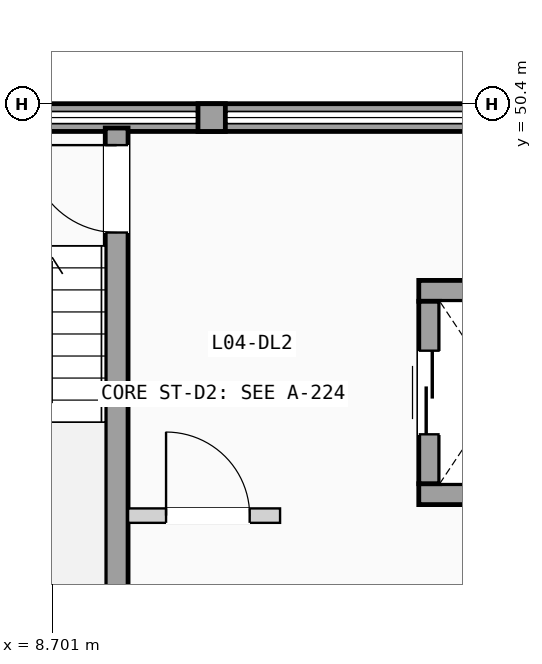
"""IFC4 building model, lengths in metres.
Left out: names, types, materials, properties, quantities, classifications, styles, units other than length and angle.
Written with IfcOpenShell. Run it as: python <this file> out.ifc"""

import sys

from ifc_helpers import new_model, si_unit, direction, frame, frame_2d, origin, place, context, subcontext, project, spatial, rectangle, extrude, element, fill, save


model = new_model("IFC4")
c1 = context("Model", 3, precision=1e-05, world=origin(), true_north=direction((0.0, 1.0)))
c2 = subcontext(c1, "Body", "Model", "MODEL_VIEW")
j1 = project(units=[si_unit("LENGTHUNIT", "METRE"), si_unit("PLANEANGLEUNIT", "RADIAN")], contexts=[c1])
p1 = place(None, origin())
s1 = spatial("IfcSite", under=j1, at=p1, CompositionType="ELEMENT")
p2 = place(p1, origin())
s2 = spatial("IfcBuilding", under=s1, at=p2, CompositionType="ELEMENT")
p3 = place(p2, frame((0.0, 0.0, 15.225)))
s3 = spatial("IfcBuildingStorey", under=s2, at=p3, CompositionType="ELEMENT", Elevation=15.225)
p4 = place(p3, frame((0.0, 50.218, 0.0), z_axis=(0.0, 0.0, 1.0), x_axis=(1.0, 0.0, 0.0)))
e1 = element("IfcWall", 1, at=p4, inside=s3, PredefinedType="SOLIDWALL", context=c2, shape_type="SweptSolid", body=[
    extrude(rectangle(XDim=21.6, YDim=0.365, at=frame_2d((10.8, 0.0))), origin(), (0.0, 0.0, 1.0), 1.11),
])
p5 = place(p3, frame((10.62, 50.218, 1.11), z_axis=(0.0, 0.0, 1.0), x_axis=(1.0, 0.0, 0.0)))
e2 = element("IfcWall", 2, at=p5, inside=s3, PredefinedType="SOLIDWALL", context=c2, shape_type="SweptSolid", body=[
    extrude(rectangle(XDim=0.36, YDim=0.365, at=frame_2d((0.18, 0.0))), origin(), (0.0, 0.0, 1.0), 1.78),
])
p6 = place(p3, frame((9.55, 43.08, 0.0), z_axis=(0.0, 0.0, 1.0), x_axis=(0.0, 1.0, 0.0)))
e3 = element("IfcWall", 3, at=p6, inside=s3, PredefinedType="SHEAR", context=c2, shape_type="SweptSolid", body=[
    extrude(rectangle(XDim=7.0, YDim=0.3, at=frame_2d((3.5, 0.0))), origin(), (0.0, 0.0, 1.0), 2.89),
])
p7 = place(p6, frame((5.625, 0.0, 0.0)))
e4 = element("IfcOpeningElement", 4, at=p7, cuts=e3, PredefinedType="OPENING", context=c2, shape_type="SweptSolid", body=[
    extrude(rectangle(XDim=1.15, YDim=2.12, at=frame_2d((0.575, 1.06))), frame((0.0, 0.16, 0.0), z_axis=(0.0, -1.0, 0.0), x_axis=(1.0, 0.0, 0.0)), (0.0, 0.0, 1.0), 0.32),
])
for number, where, z_axis, x_axis in (
    (5, (13.525, 45.262, 0.0), (0.0, 0.0, 1.0), (1.0, 0.0, 0.0)),
    (6, (13.525, 47.938, 0.0), (0.0, 0.0, 1.0), (1.0, 0.0, 0.0)),
):
    element("IfcWall", number, at=place(p3, frame(where, z_axis=z_axis, x_axis=x_axis)), inside=s3, PredefinedType="SHEAR", context=c2, shape_type="SweptSolid", body=[
        extrude(rectangle(XDim=2.15, YDim=0.275, at=frame_2d((1.075, 0.0))), origin(), (0.0, 0.0, 1.0), 2.89),
    ])
p8 = place(p3, frame((13.663, 45.4, 0.0), z_axis=(0.0, 0.0, 1.0), x_axis=(0.0, 1.0, 0.0)))
e7 = element("IfcWall", 7, at=p8, inside=s3, PredefinedType="SHEAR", context=c2, shape_type="SweptSolid", body=[
    extrude(rectangle(XDim=2.4, YDim=0.275, at=frame_2d((1.2, 0.0))), origin(), (0.0, 0.0, 1.0), 2.89),
])
p9 = place(p8, frame((0.65, 0.0, 0.0)))
e8 = element("IfcOpeningElement", 8, at=p9, cuts=e7, PredefinedType="OPENING", context=c2, shape_type="SweptSolid", body=[
    extrude(rectangle(XDim=1.1, YDim=2.15, at=frame_2d((0.55, 1.075))), frame((0.0, 0.147, 0.0), z_axis=(0.0, -1.0, 0.0), x_axis=(1.0, 0.0, 0.0)), (0.0, 0.0, 1.0), 0.295),
])
p10 = place(p3, frame((9.7, 44.98, 0.0), z_axis=(0.0, 0.0, 1.0), x_axis=(1.0, 0.0, 0.0)))
e9 = element("IfcWall", 9, at=p10, inside=s3, PredefinedType="PARTITIONING", context=c2, shape_type="SweptSolid", body=[
    extrude(rectangle(XDim=2.0, YDim=0.19, at=frame_2d((1.0, 0.0))), origin(), (0.0, 0.0, 1.0), 2.87),
])
p11 = place(p10, frame((0.5, 0.0, 0.0)))
e10 = element("IfcOpeningElement", 10, at=p11, cuts=e9, PredefinedType="OPENING", context=c2, shape_type="SweptSolid", body=[
    extrude(rectangle(XDim=1.1, YDim=2.12, at=frame_2d((0.55, 1.06))), frame((0.0, 0.105, 0.0), z_axis=(0.0, -1.0, 0.0), x_axis=(1.0, 0.0, 0.0)), (0.0, 0.0, 1.0), 0.21),
])
p12 = place(p7, origin())
e11 = element("IfcDoor", 11, at=p12, inside=s3, OperationType="SINGLE_SWING_RIGHT", PredefinedType="DOOR", context=c2, shape_type="SweptSolid", body=[
    extrude(rectangle(XDim=1.15, YDim=2.12, at=frame_2d((0.575, 1.06))), frame((0.0, 0.025, 0.0), z_axis=(0.0, -1.0, 0.0), x_axis=(1.0, 0.0, 0.0)), (0.0, 0.0, 1.0), 0.05),
])
fill(e4, e11)
p13 = place(p9, origin())
e12 = element("IfcDoor", 12, at=p13, inside=s3, OperationType="SLIDING_TO_LEFT", PredefinedType="DOOR", context=c2, shape_type="SweptSolid", body=[
    extrude(rectangle(XDim=1.1, YDim=2.15, at=frame_2d((0.55, 1.075))), frame((0.0, 0.025, 0.0), z_axis=(0.0, -1.0, 0.0), x_axis=(1.0, 0.0, 0.0)), (0.0, 0.0, 1.0), 0.05),
])
fill(e8, e12)
p14 = place(p11, origin())
e13 = element("IfcDoor", 13, at=p14, inside=s3, OperationType="SINGLE_SWING_LEFT", PredefinedType="DOOR", context=c2, shape_type="SweptSolid", body=[
    extrude(rectangle(XDim=1.1, YDim=2.12, at=frame_2d((0.55, 1.06))), frame((0.0, 0.025, 0.0), z_axis=(0.0, -1.0, 0.0), x_axis=(1.0, 0.0, 0.0)), (0.0, 0.0, 1.0), 0.05),
])
fill(e10, e13)
save(model, sys.argv[1])
